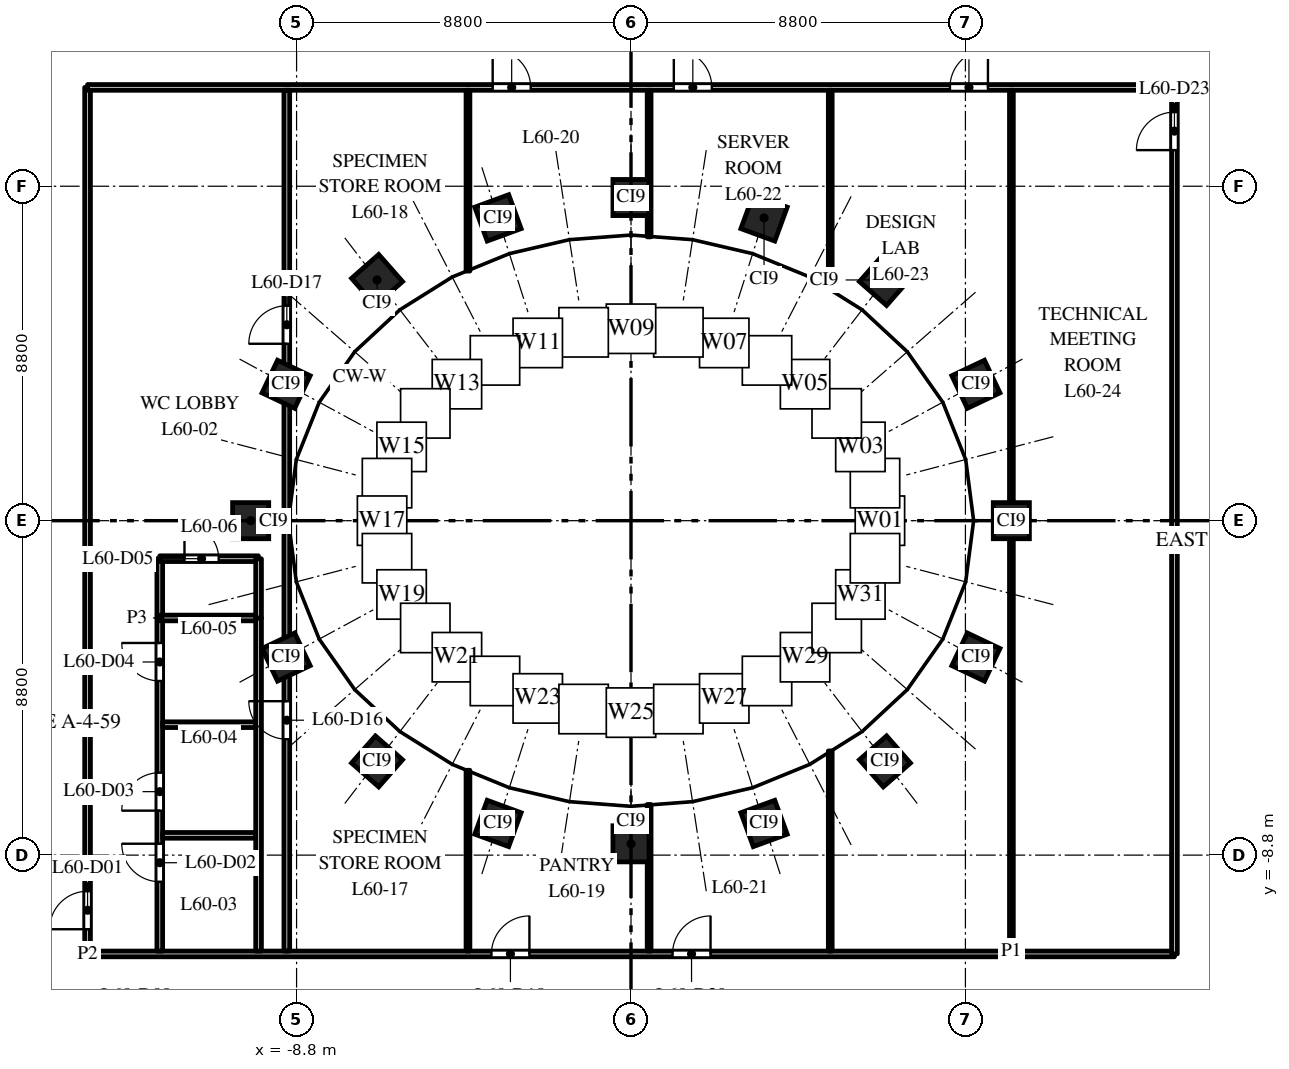
"""IFC4 building model, lengths in metres.
Left out: names, types, materials, properties, quantities, classifications, styles, units other than length and angle.
Written with IfcOpenShell. Run it as: python <this file> out.ifc"""

import sys

from ifc_helpers import new_model, si_unit, direction, frame, frame_2d, origin, origin_2d, place, context, subcontext, project, spatial, rectangle, extrude, element, fill, save


model = new_model("IFC4")
c1 = context("Model", 3, precision=1e-05, world=origin(), true_north=direction((0.0, 1.0)))
c2 = subcontext(c1, "Body", "Model", "MODEL_VIEW")
j1 = project(units=[si_unit("LENGTHUNIT", "METRE"), si_unit("PLANEANGLEUNIT", "RADIAN")], contexts=[c1])
p1 = place(None, origin())
s1 = spatial("IfcSite", under=j1, at=p1, CompositionType="ELEMENT")
p2 = place(p1, origin())
s2 = spatial("IfcBuilding", under=s1, at=p2, CompositionType="ELEMENT")
p3 = place(p2, frame((0.0, 0.0, 281.5)))
s3 = spatial("IfcBuildingStorey", under=s2, at=p3, CompositionType="ELEMENT", Elevation=281.5)
for number, where, z_axis, x_axis in (
    (1, (10.008, 0.0, 0.0), (0.0, 0.0, 1.0), (0.0, 1.0, 0.0)),
    (2, (9.076, 3.588, 0.0), (0.0, 0.0, 1.0), (-0.429, 0.903, 0.0)),
    (3, (6.682, 6.334, 0.0), (0.0, 0.0, 1.0), (-0.751, 0.66, 0.0)),
    (4, (3.501, 7.967, 0.0), (0.0, 0.0, 1.0), (-0.939, 0.344, 0.0)),
    (5, (0.0, 8.503, 0.0), (0.0, 0.0, 1.0), (-1.0, 0.0, 0.0)),
    (6, (-3.501, 7.967, 0.0), (0.0, 0.0, 1.0), (-0.939, -0.344, 0.0)),
    (7, (-6.682, 6.334, 0.0), (0.0, 0.0, 1.0), (-0.751, -0.66, 0.0)),
    (8, (-9.076, 3.588, 0.0), (0.0, 0.0, 1.0), (-0.429, -0.903, 0.0)),
    (9, (-10.008, 0.0, 0.0), (0.0, 0.0, 1.0), (0.0, -1.0, 0.0)),
    (10, (-9.076, -3.588, 0.0), (0.0, 0.0, 1.0), (0.429, -0.903, 0.0)),
    (11, (-6.682, -6.334, 0.0), (0.0, 0.0, 1.0), (0.751, -0.66, 0.0)),
    (12, (-3.501, -7.967, 0.0), (0.0, 0.0, 1.0), (0.939, -0.344, 0.0)),
    (13, (0.0, -8.503, 0.0), (0.0, 0.0, 1.0), (1.0, 0.0, 0.0)),
    (14, (3.501, -7.967, 0.0), (0.0, 0.0, 1.0), (0.939, 0.344, 0.0)),
    (15, (6.682, -6.334, 0.0), (0.0, 0.0, 1.0), (0.751, 0.66, 0.0)),
    (16, (9.076, -3.588, 0.0), (0.0, 0.0, 1.0), (0.429, 0.903, 0.0)),
):
    element("IfcColumn", number, at=place(p3, frame(where, z_axis=z_axis, x_axis=x_axis)), inside=s3, PredefinedType="COLUMN", context=c2, shape_type="SweptSolid", body=[
        extrude(rectangle(XDim=0.95, YDim=0.95, at=origin_2d()), origin(), (0.0, 0.0, 1.0), 4.0),
    ])
p4 = place(p3, frame((-14.3, -11.4, 0.0), z_axis=(0.0, 0.0, 1.0), x_axis=(0.0, 1.0, 0.0)))
e17 = element("IfcWall", 17, at=p4, inside=s3, PredefinedType="PARTITIONING", context=c2, shape_type="SweptSolid", body=[
    extrude(rectangle(XDim=22.8, YDim=0.15, at=frame_2d((11.4, 0.0))), origin(), (0.0, 0.0, 1.0), 2.75),
])
p5 = place(p4, frame((0.65, 0.0, 0.0)))
e18 = element("IfcOpeningElement", 18, at=p5, cuts=e17, PredefinedType="OPENING", context=c2, shape_type="SweptSolid", body=[
    extrude(rectangle(XDim=1.0, YDim=2.1, at=frame_2d((0.5, 1.05))), frame((0.0, 0.085, 0.0), z_axis=(0.0, -1.0, 0.0), x_axis=(1.0, 0.0, 0.0)), (0.0, 0.0, 1.0), 0.17),
])
p6 = place(p3, frame((-14.3, -11.4, 0.0), z_axis=(0.0, 0.0, 1.0), x_axis=(1.0, 0.0, 0.0)))
e19 = element("IfcWall", 19, at=p6, inside=s3, PredefinedType="PARTITIONING", context=c2, shape_type="SweptSolid", body=[
    extrude(rectangle(XDim=28.6, YDim=0.15, at=frame_2d((14.3, 0.0))), origin(), (0.0, 0.0, 1.0), 2.85),
])
p7 = place(p6, frame((10.627, 0.0, 0.0)))
e20 = element("IfcOpeningElement", 20, at=p7, cuts=e19, PredefinedType="OPENING", context=c2, shape_type="SweptSolid", body=[
    extrude(rectangle(XDim=1.0, YDim=2.1, at=frame_2d((0.5, 1.05))), frame((0.0, 0.085, 0.0), z_axis=(0.0, -1.0, 0.0), x_axis=(1.0, 0.0, 0.0)), (0.0, 0.0, 1.0), 0.17),
])
p8 = place(p6, frame((15.393, 0.0, 0.0)))
e21 = element("IfcOpeningElement", 21, at=p8, cuts=e19, PredefinedType="OPENING", context=c2, shape_type="SweptSolid", body=[
    extrude(rectangle(XDim=1.0, YDim=2.1, at=frame_2d((0.5, 1.05))), frame((0.0, 0.085, 0.0), z_axis=(0.0, -1.0, 0.0), x_axis=(1.0, 0.0, 0.0)), (0.0, 0.0, 1.0), 0.17),
])
p9 = place(p3, frame((-14.3, 11.4, 0.0), z_axis=(0.0, 0.0, 1.0), x_axis=(1.0, 0.0, 0.0)))
e22 = element("IfcWall", 22, at=p9, inside=s3, PredefinedType="PARTITIONING", context=c2, shape_type="SweptSolid", body=[
    extrude(rectangle(XDim=28.6, YDim=0.15, at=frame_2d((14.3, 0.0))), origin(), (0.0, 0.0, 1.0), 2.85),
])
p10 = place(p9, frame((10.66, 0.0, 0.0)))
e23 = element("IfcOpeningElement", 23, at=p10, cuts=e22, PredefinedType="OPENING", context=c2, shape_type="SweptSolid", body=[
    extrude(rectangle(XDim=1.0, YDim=2.1, at=frame_2d((0.5, 1.05))), frame((0.0, 0.085, 0.0), z_axis=(0.0, -1.0, 0.0), x_axis=(1.0, 0.0, 0.0)), (0.0, 0.0, 1.0), 0.17),
])
p11 = place(p9, frame((15.427, 0.0, 0.0)))
e24 = element("IfcOpeningElement", 24, at=p11, cuts=e22, PredefinedType="OPENING", context=c2, shape_type="SweptSolid", body=[
    extrude(rectangle(XDim=1.0, YDim=2.1, at=frame_2d((0.5, 1.05))), frame((0.0, 0.085, 0.0), z_axis=(0.0, -1.0, 0.0), x_axis=(1.0, 0.0, 0.0)), (0.0, 0.0, 1.0), 0.17),
])
p12 = place(p9, frame((22.693, 0.0, 0.0)))
e25 = element("IfcOpeningElement", 25, at=p12, cuts=e22, PredefinedType="OPENING", context=c2, shape_type="SweptSolid", body=[
    extrude(rectangle(XDim=1.0, YDim=2.1, at=frame_2d((0.5, 1.05))), frame((0.0, 0.085, 0.0), z_axis=(0.0, -1.0, 0.0), x_axis=(1.0, 0.0, 0.0)), (0.0, 0.0, 1.0), 0.17),
])
p13 = place(p3, frame((-12.4, -11.325, 0.0), z_axis=(0.0, 0.0, 1.0), x_axis=(0.0, 1.0, 0.0)))
e26 = element("IfcWall", 26, at=p13, inside=s3, PredefinedType="PARTITIONING", context=c2, shape_type="SweptSolid", body=[
    extrude(rectangle(XDim=8.765, YDim=0.15, at=frame_2d((4.382, 0.0))), origin(), (0.0, 0.0, 1.0), 2.75),
])
p14 = place(p13, frame((1.825, 0.0, 0.0)))
e27 = element("IfcOpeningElement", 27, at=p14, cuts=e26, PredefinedType="OPENING", context=c2, shape_type="SweptSolid", body=[
    extrude(rectangle(XDim=1.0, YDim=2.1, at=frame_2d((0.5, 1.05))), frame((0.0, 0.085, 0.0), z_axis=(0.0, -1.0, 0.0), x_axis=(1.0, 0.0, 0.0)), (0.0, 0.0, 1.0), 0.17),
])
p15 = place(p13, frame((3.695, 0.0, 0.0)))
e28 = element("IfcOpeningElement", 28, at=p15, cuts=e26, PredefinedType="OPENING", context=c2, shape_type="SweptSolid", body=[
    extrude(rectangle(XDim=1.0, YDim=2.1, at=frame_2d((0.5, 1.05))), frame((0.0, 0.085, 0.0), z_axis=(0.0, -1.0, 0.0), x_axis=(1.0, 0.0, 0.0)), (0.0, 0.0, 1.0), 0.17),
])
p16 = place(p13, frame((7.107, 0.0, 0.0)))
e29 = element("IfcOpeningElement", 29, at=p16, cuts=e26, PredefinedType="OPENING", context=c2, shape_type="SweptSolid", body=[
    extrude(rectangle(XDim=1.0, YDim=2.1, at=frame_2d((0.5, 1.05))), frame((0.0, 0.085, 0.0), z_axis=(0.0, -1.0, 0.0), x_axis=(1.0, 0.0, 0.0)), (0.0, 0.0, 1.0), 0.17),
])
p17 = place(p3, frame((-12.325, -8.28, 0.0), z_axis=(0.0, 0.0, 1.0), x_axis=(1.0, 0.0, 0.0)))
e30 = element("IfcWall", 30, at=p17, inside=s3, PredefinedType="PARTITIONING", context=c2, shape_type="SweptSolid", body=[
    extrude(rectangle(XDim=2.45, YDim=0.15, at=frame_2d((1.225, 0.0))), origin(), (0.0, 0.0, 1.0), 2.75),
])
p18 = place(p3, frame((-12.325, -5.368, 0.0), z_axis=(0.0, 0.0, 1.0), x_axis=(1.0, 0.0, 0.0)))
e31 = element("IfcWall", 31, at=p18, inside=s3, PredefinedType="PARTITIONING", context=c2, shape_type="SweptSolid", body=[
    extrude(rectangle(XDim=2.45, YDim=0.15, at=frame_2d((1.225, 0.0))), origin(), (0.0, 0.0, 1.0), 3.7),
])
p19 = place(p3, frame((-12.4, -2.56, 0.0), z_axis=(0.0, 0.0, 1.0), x_axis=(0.0, 1.0, 0.0)))
e32 = element("IfcWall", 32, at=p19, inside=s3, PredefinedType="PARTITIONING", context=c2, shape_type="SweptSolid", body=[
    extrude(rectangle(XDim=1.56, YDim=0.15, at=frame_2d((0.78, 0.0))), origin(), (0.0, 0.0, 1.0), 3.7),
])
p20 = place(p3, frame((-12.4, -2.56, 0.0), z_axis=(0.0, 0.0, 1.0), x_axis=(1.0, 0.0, 0.0)))
e33 = element("IfcWall", 33, at=p20, inside=s3, PredefinedType="PARTITIONING", context=c2, shape_type="SweptSolid", body=[
    extrude(rectangle(XDim=2.6, YDim=0.15, at=frame_2d((1.3, 0.0))), origin(), (0.0, 0.0, 1.0), 3.7),
])
p21 = place(p3, frame((-12.4, -1.0, 0.0), z_axis=(0.0, 0.0, 1.0), x_axis=(1.0, 0.0, 0.0)))
e34 = element("IfcWall", 34, at=p21, inside=s3, PredefinedType="PARTITIONING", context=c2, shape_type="SweptSolid", body=[
    extrude(rectangle(XDim=2.596, YDim=0.15, at=frame_2d((1.298, 0.0))), origin(), (0.0, 0.0, 1.0), 3.7),
])
p22 = place(p21, frame((0.65, 0.0, 0.0)))
e35 = element("IfcOpeningElement", 35, at=p22, cuts=e34, PredefinedType="OPENING", context=c2, shape_type="SweptSolid", body=[
    extrude(rectangle(XDim=0.9, YDim=2.1, at=frame_2d((0.45, 1.05))), frame((0.0, 0.085, 0.0), z_axis=(0.0, -1.0, 0.0), x_axis=(1.0, 0.0, 0.0)), (0.0, 0.0, 1.0), 0.17),
])
p23 = place(p3, frame((-9.8, -11.325, 0.0), z_axis=(0.0, 0.0, 1.0), x_axis=(0.0, 1.0, 0.0)))
e36 = element("IfcWall", 36, at=p23, inside=s3, PredefinedType="PARTITIONING", context=c2, shape_type="SweptSolid", body=[
    extrude(rectangle(XDim=8.765, YDim=0.15, at=frame_2d((4.382, 0.0))), origin(), (0.0, 0.0, 1.0), 2.75),
])
p24 = place(p3, frame((-9.8, -2.56, 0.0), z_axis=(0.0, 0.0, 1.0), x_axis=(0.0, 1.0, 0.0)))
e37 = element("IfcWall", 37, at=p24, inside=s3, PredefinedType="PARTITIONING", context=c2, shape_type="SweptSolid", body=[
    extrude(rectangle(XDim=1.556, YDim=0.15, at=frame_2d((0.778, 0.0))), origin(), (0.0, 0.0, 1.0), 3.7),
])
p25 = place(p3, frame((-9.057, -11.325, 0.0), z_axis=(0.0, 0.0, 1.0), x_axis=(0.0, 1.0, 0.0)))
e38 = element("IfcWall", 38, at=p25, inside=s3, PredefinedType="PARTITIONING", context=c2, shape_type="SweptSolid", body=[
    extrude(rectangle(XDim=11.28, YDim=0.15, at=frame_2d((5.64, 0.0))), origin(), (0.0, 0.0, 1.0), 2.75),
])
p26 = place(p25, frame((5.575, 0.0, 0.0)))
e39 = element("IfcOpeningElement", 39, at=p26, cuts=e38, PredefinedType="OPENING", context=c2, shape_type="SweptSolid", body=[
    extrude(rectangle(XDim=1.0, YDim=2.1, at=frame_2d((0.5, 1.05))), frame((0.0, 0.085, 0.0), z_axis=(0.0, -1.0, 0.0), x_axis=(1.0, 0.0, 0.0)), (0.0, 0.0, 1.0), 0.17),
])
p27 = place(p3, frame((-9.057, 0.045, 0.0), z_axis=(0.0, 0.0, 1.0), x_axis=(0.0, 1.0, 0.0)))
e40 = element("IfcWall", 40, at=p27, inside=s3, PredefinedType="PARTITIONING", context=c2, shape_type="SweptSolid", body=[
    extrude(rectangle(XDim=11.28, YDim=0.15, at=frame_2d((5.64, 0.0))), origin(), (0.0, 0.0, 1.0), 2.75),
])
p28 = place(p27, frame((4.61, 0.0, 0.0)))
e41 = element("IfcOpeningElement", 41, at=p28, cuts=e40, PredefinedType="OPENING", context=c2, shape_type="SweptSolid", body=[
    extrude(rectangle(XDim=1.0, YDim=2.1, at=frame_2d((0.5, 1.05))), frame((0.0, 0.085, 0.0), z_axis=(0.0, -1.0, 0.0), x_axis=(1.0, 0.0, 0.0)), (0.0, 0.0, 1.0), 0.17),
])
for number, where, z_axis, x_axis in (
    (42, (-4.29, -11.325, 0.0), (0.0, 0.0, 1.0), (0.0, 1.0, 0.0)),
    (43, (-4.29, 6.568, 0.0), (0.0, 0.0, 1.0), (0.0, 1.0, 0.0)),
):
    element("IfcWall", number, at=place(p3, frame(where, z_axis=z_axis, x_axis=x_axis)), inside=s3, PredefinedType="PARTITIONING", context=c2, shape_type="SweptSolid", body=[
        extrude(rectangle(XDim=4.757, YDim=0.1, at=frame_2d((2.378, 0.0))), origin(), (0.0, 0.0, 1.0), 2.85),
    ])
for number, where, z_axis, x_axis in (
    (44, (0.477, -11.325, 0.0), (0.0, 0.0, 1.0), (0.0, 1.0, 0.0)),
    (45, (0.477, 7.468, 0.0), (0.0, 0.0, 1.0), (0.0, 1.0, 0.0)),
):
    element("IfcWall", number, at=place(p3, frame(where, z_axis=z_axis, x_axis=x_axis)), inside=s3, PredefinedType="PARTITIONING", context=c2, shape_type="SweptSolid", body=[
        extrude(rectangle(XDim=3.857, YDim=0.1, at=frame_2d((1.928, 0.0))), origin(), (0.0, 0.0, 1.0), 3.0),
    ])
for number, where, z_axis, x_axis in (
    (46, (5.243, -11.325, 0.0), (0.0, 0.0, 1.0), (0.0, 1.0, 0.0)),
    (47, (5.243, 6.059, 0.0), (0.0, 0.0, 1.0), (0.0, 1.0, 0.0)),
):
    element("IfcWall", number, at=place(p3, frame(where, z_axis=z_axis, x_axis=x_axis)), inside=s3, PredefinedType="PARTITIONING", context=c2, shape_type="SweptSolid", body=[
        extrude(rectangle(XDim=5.266, YDim=0.1, at=frame_2d((2.633, 0.0))), origin(), (0.0, 0.0, 1.0), 2.85),
    ])
p29 = place(p3, frame((10.01, -11.325, 0.0), z_axis=(0.0, 0.0, 1.0), x_axis=(0.0, 1.0, 0.0)))
e48 = element("IfcWall", 48, at=p29, inside=s3, PredefinedType="PARTITIONING", context=c2, shape_type="SweptSolid", body=[
    extrude(rectangle(XDim=22.65, YDim=0.1, at=frame_2d((11.325, 0.0))), origin(), (0.0, 0.0, 1.0), 2.75),
])
p30 = place(p3, frame((14.3, -11.4, 0.0), z_axis=(0.0, 0.0, 1.0), x_axis=(0.0, 1.0, 0.0)))
e49 = element("IfcWall", 49, at=p30, inside=s3, PredefinedType="PARTITIONING", context=c2, shape_type="SweptSolid", body=[
    extrude(rectangle(XDim=22.8, YDim=0.15, at=frame_2d((11.4, 0.0))), origin(), (0.0, 0.0, 1.0), 2.75),
])
p31 = place(p30, frame((21.15, 0.0, 0.0)))
e50 = element("IfcOpeningElement", 50, at=p31, cuts=e49, PredefinedType="OPENING", context=c2, shape_type="SweptSolid", body=[
    extrude(rectangle(XDim=1.0, YDim=2.1, at=frame_2d((0.5, 1.05))), frame((0.0, 0.085, 0.0), z_axis=(0.0, -1.0, 0.0), x_axis=(1.0, 0.0, 0.0)), (0.0, 0.0, 1.0), 0.17),
])
p32 = place(p5, origin())
e51 = element("IfcDoor", 51, at=p32, inside=s3, OperationType="SINGLE_SWING_LEFT", PredefinedType="DOOR", context=c2, shape_type="SweptSolid", body=[
    extrude(rectangle(XDim=1.0, YDim=2.1, at=frame_2d((0.5, 1.05))), frame((0.0, 0.025, 0.0), z_axis=(0.0, -1.0, 0.0), x_axis=(1.0, 0.0, 0.0)), (0.0, 0.0, 1.0), 0.05),
])
fill(e18, e51)
p33 = place(p14, origin())
e52 = element("IfcDoor", 52, at=p33, inside=s3, OperationType="SINGLE_SWING_RIGHT", PredefinedType="DOOR", context=c2, shape_type="SweptSolid", body=[
    extrude(rectangle(XDim=1.0, YDim=2.1, at=frame_2d((0.5, 1.05))), frame((0.0, 0.025, 0.0), z_axis=(0.0, -1.0, 0.0), x_axis=(1.0, 0.0, 0.0)), (0.0, 0.0, 1.0), 0.05),
])
fill(e27, e52)
p34 = place(p15, origin())
e53 = element("IfcDoor", 53, at=p34, inside=s3, OperationType="SINGLE_SWING_LEFT", PredefinedType="DOOR", context=c2, shape_type="SweptSolid", body=[
    extrude(rectangle(XDim=1.0, YDim=2.1, at=frame_2d((0.5, 1.05))), frame((0.0, 0.025, 0.0), z_axis=(0.0, -1.0, 0.0), x_axis=(1.0, 0.0, 0.0)), (0.0, 0.0, 1.0), 0.05),
])
fill(e28, e53)
p35 = place(p16, origin())
e54 = element("IfcDoor", 54, at=p35, inside=s3, OperationType="SINGLE_SWING_RIGHT", PredefinedType="DOOR", context=c2, shape_type="SweptSolid", body=[
    extrude(rectangle(XDim=1.0, YDim=2.1, at=frame_2d((0.5, 1.05))), frame((0.0, 0.025, 0.0), z_axis=(0.0, -1.0, 0.0), x_axis=(1.0, 0.0, 0.0)), (0.0, 0.0, 1.0), 0.05),
])
fill(e29, e54)
p36 = place(p22, origin())
e55 = element("IfcDoor", 55, at=p36, inside=s3, OperationType="SINGLE_SWING_LEFT", PredefinedType="DOOR", context=c2, shape_type="SweptSolid", body=[
    extrude(rectangle(XDim=0.9, YDim=2.1, at=frame_2d((0.45, 1.05))), frame((0.0, 0.025, 0.0), z_axis=(0.0, -1.0, 0.0), x_axis=(1.0, 0.0, 0.0)), (0.0, 0.0, 1.0), 0.05),
])
fill(e35, e55)
p37 = place(p26, origin())
e56 = element("IfcDoor", 56, at=p37, inside=s3, OperationType="SINGLE_SWING_RIGHT", PredefinedType="DOOR", context=c2, shape_type="SweptSolid", body=[
    extrude(rectangle(XDim=1.0, YDim=2.1, at=frame_2d((0.5, 1.05))), frame((0.0, 0.025, 0.0), z_axis=(0.0, -1.0, 0.0), x_axis=(1.0, 0.0, 0.0)), (0.0, 0.0, 1.0), 0.05),
])
fill(e39, e56)
p38 = place(p28, origin())
e57 = element("IfcDoor", 57, at=p38, inside=s3, OperationType="SINGLE_SWING_LEFT", PredefinedType="DOOR", context=c2, shape_type="SweptSolid", body=[
    extrude(rectangle(XDim=1.0, YDim=2.1, at=frame_2d((0.5, 1.05))), frame((0.0, 0.025, 0.0), z_axis=(0.0, -1.0, 0.0), x_axis=(1.0, 0.0, 0.0)), (0.0, 0.0, 1.0), 0.05),
])
fill(e41, e57)
p39 = place(p7, origin())
e58 = element("IfcDoor", 58, at=p39, inside=s3, OperationType="SINGLE_SWING_RIGHT", PredefinedType="DOOR", context=c2, shape_type="SweptSolid", body=[
    extrude(rectangle(XDim=1.0, YDim=2.1, at=frame_2d((0.5, 1.05))), frame((0.0, 0.025, 0.0), z_axis=(0.0, -1.0, 0.0), x_axis=(1.0, 0.0, 0.0)), (0.0, 0.0, 1.0), 0.05),
])
fill(e20, e58)
p40 = place(p10, origin())
e59 = element("IfcDoor", 59, at=p40, inside=s3, OperationType="SINGLE_SWING_LEFT", PredefinedType="DOOR", context=c2, shape_type="SweptSolid", body=[
    extrude(rectangle(XDim=1.0, YDim=2.1, at=frame_2d((0.5, 1.05))), frame((0.0, 0.025, 0.0), z_axis=(0.0, -1.0, 0.0), x_axis=(1.0, 0.0, 0.0)), (0.0, 0.0, 1.0), 0.05),
])
fill(e23, e59)
p41 = place(p8, origin())
e60 = element("IfcDoor", 60, at=p41, inside=s3, OperationType="SINGLE_SWING_RIGHT", PredefinedType="DOOR", context=c2, shape_type="SweptSolid", body=[
    extrude(rectangle(XDim=1.0, YDim=2.1, at=frame_2d((0.5, 1.05))), frame((0.0, 0.025, 0.0), z_axis=(0.0, -1.0, 0.0), x_axis=(1.0, 0.0, 0.0)), (0.0, 0.0, 1.0), 0.05),
])
fill(e21, e60)
p42 = place(p11, origin())
e61 = element("IfcDoor", 61, at=p42, inside=s3, OperationType="SINGLE_SWING_LEFT", PredefinedType="DOOR", context=c2, shape_type="SweptSolid", body=[
    extrude(rectangle(XDim=1.0, YDim=2.1, at=frame_2d((0.5, 1.05))), frame((0.0, 0.025, 0.0), z_axis=(0.0, -1.0, 0.0), x_axis=(1.0, 0.0, 0.0)), (0.0, 0.0, 1.0), 0.05),
])
fill(e24, e61)
p43 = place(p12, origin())
e62 = element("IfcDoor", 62, at=p43, inside=s3, OperationType="SINGLE_SWING_RIGHT", PredefinedType="DOOR", context=c2, shape_type="SweptSolid", body=[
    extrude(rectangle(XDim=1.0, YDim=2.1, at=frame_2d((0.5, 1.05))), frame((0.0, 0.025, 0.0), z_axis=(0.0, -1.0, 0.0), x_axis=(1.0, 0.0, 0.0)), (0.0, 0.0, 1.0), 0.05),
])
fill(e25, e62)
p44 = place(p31, origin())
e63 = element("IfcDoor", 63, at=p44, inside=s3, OperationType="SINGLE_SWING_LEFT", PredefinedType="DOOR", context=c2, shape_type="SweptSolid", body=[
    extrude(rectangle(XDim=1.0, YDim=2.1, at=frame_2d((0.5, 1.05))), frame((0.0, 0.025, 0.0), z_axis=(0.0, -1.0, 0.0), x_axis=(1.0, 0.0, 0.0)), (0.0, 0.0, 1.0), 0.05),
])
fill(e50, e63)
save(model, sys.argv[1])
